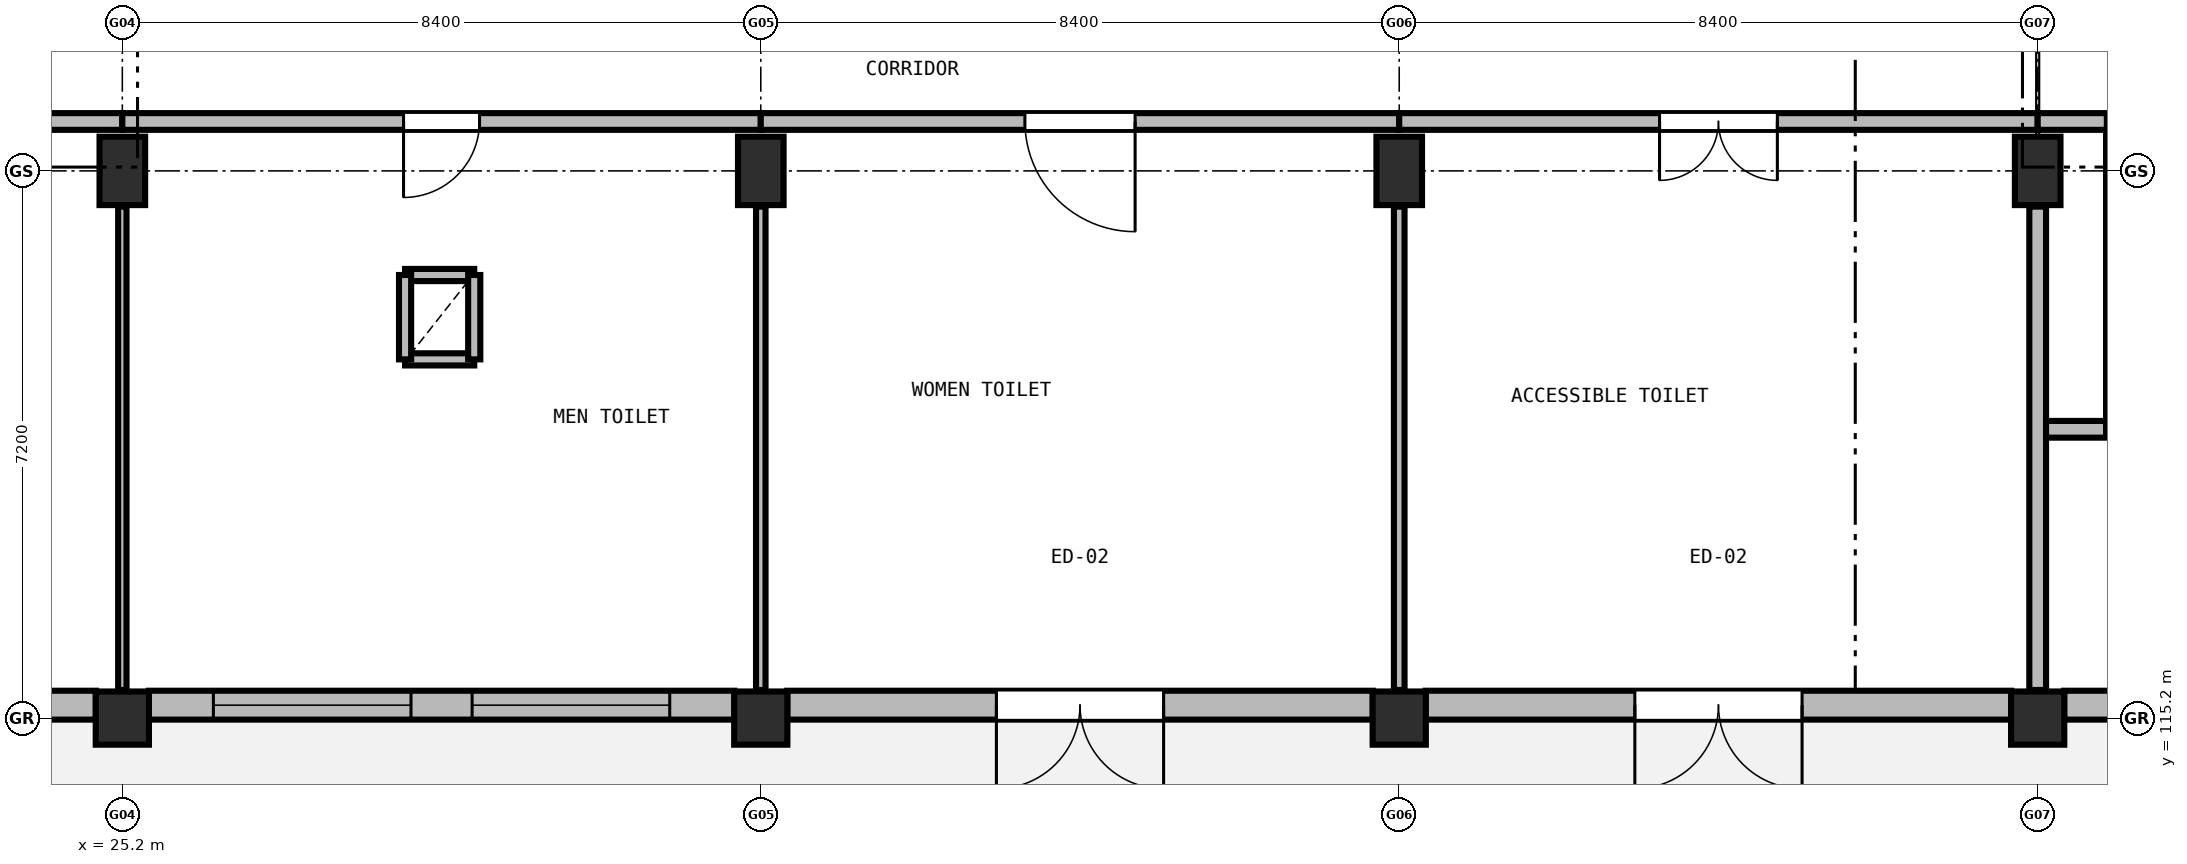
"""IFC4 building model, lengths in metres.
Left out: names, types, materials, properties, quantities, classifications, styles, units other than length and angle.
Written with IfcOpenShell. Run it as: python <this file> out.ifc"""

import sys

from ifc_helpers import new_model, si_unit, direction, frame, frame_2d, origin, origin_2d, place, context, subcontext, project, spatial, rectangle, extrude, element, fill, save


model = new_model("IFC4")
c1 = context("Model", 3, precision=1e-05, world=origin(), true_north=direction((0.0, 1.0)))
c2 = subcontext(c1, "Body", "Model", "MODEL_VIEW")
j1 = project(units=[si_unit("LENGTHUNIT", "METRE"), si_unit("PLANEANGLEUNIT", "RADIAN")], contexts=[c1])
p1 = place(None, origin())
s1 = spatial("IfcSite", under=j1, at=p1, CompositionType="ELEMENT")
p2 = place(p1, origin())
s2 = spatial("IfcBuilding", under=s1, at=p2, CompositionType="ELEMENT")
p3 = place(p2, origin())
s3 = spatial("IfcBuildingStorey", under=s2, at=p3, CompositionType="ELEMENT", Elevation=0.0)
p4 = place(p3, frame((25.2, 115.2, 0.0), z_axis=(0.0, 0.0, 1.0), x_axis=(1.0, 0.0, 0.0)))
e1 = element("IfcColumn", 1, at=p4, inside=s3, PredefinedType="COLUMN", context=c2, shape_type="SweptSolid", body=[
    extrude(rectangle(XDim=0.7, YDim=0.7, at=origin_2d()), origin(), (0.0, 0.0, 1.0), 5.1),
])
p5 = place(p3, frame((25.2, 122.4, 0.0), z_axis=(0.0, 0.0, 1.0), x_axis=(1.0, 0.0, 0.0)))
e2 = element("IfcColumn", 2, at=p5, inside=s3, PredefinedType="COLUMN", context=c2, shape_type="SweptSolid", body=[
    extrude(rectangle(XDim=0.6, YDim=0.9, at=origin_2d()), origin(), (0.0, 0.0, 1.0), 5.1),
])
p6 = place(p3, frame((33.6, 115.2, 0.0), z_axis=(0.0, 0.0, 1.0), x_axis=(1.0, 0.0, 0.0)))
e3 = element("IfcColumn", 3, at=p6, inside=s3, PredefinedType="COLUMN", context=c2, shape_type="SweptSolid", body=[
    extrude(rectangle(XDim=0.7, YDim=0.7, at=origin_2d()), origin(), (0.0, 0.0, 1.0), 5.1),
])
p7 = place(p3, frame((33.6, 122.4, 0.0), z_axis=(0.0, 0.0, 1.0), x_axis=(1.0, 0.0, 0.0)))
e4 = element("IfcColumn", 4, at=p7, inside=s3, PredefinedType="COLUMN", context=c2, shape_type="SweptSolid", body=[
    extrude(rectangle(XDim=0.6, YDim=0.9, at=origin_2d()), origin(), (0.0, 0.0, 1.0), 5.1),
])
p8 = place(p3, frame((42.0, 115.2, 0.0), z_axis=(0.0, 0.0, 1.0), x_axis=(1.0, 0.0, 0.0)))
e5 = element("IfcColumn", 5, at=p8, inside=s3, PredefinedType="COLUMN", context=c2, shape_type="SweptSolid", body=[
    extrude(rectangle(XDim=0.7, YDim=0.7, at=origin_2d()), origin(), (0.0, 0.0, 1.0), 5.1),
])
p9 = place(p3, frame((42.0, 122.4, 0.0), z_axis=(0.0, 0.0, 1.0), x_axis=(1.0, 0.0, 0.0)))
e6 = element("IfcColumn", 6, at=p9, inside=s3, PredefinedType="COLUMN", context=c2, shape_type="SweptSolid", body=[
    extrude(rectangle(XDim=0.6, YDim=0.9, at=origin_2d()), origin(), (0.0, 0.0, 1.0), 5.1),
])
p10 = place(p3, frame((50.4, 115.2, 0.0), z_axis=(0.0, 0.0, 1.0), x_axis=(1.0, 0.0, 0.0)))
e7 = element("IfcColumn", 7, at=p10, inside=s3, PredefinedType="COLUMN", context=c2, shape_type="SweptSolid", body=[
    extrude(rectangle(XDim=0.7, YDim=0.7, at=origin_2d()), origin(), (0.0, 0.0, 1.0), 5.1),
])
p11 = place(p3, frame((50.4, 122.4, 0.0), z_axis=(0.0, 0.0, 1.0), x_axis=(1.0, 0.0, 0.0)))
e8 = element("IfcColumn", 8, at=p11, inside=s3, PredefinedType="COLUMN", context=c2, shape_type="SweptSolid", body=[
    extrude(rectangle(XDim=0.6, YDim=0.9, at=origin_2d()), origin(), (0.0, 0.0, 1.0), 5.1),
])
p12 = place(p3, frame((58.452, 115.37, 0.0), z_axis=(0.0, 0.0, 1.0), x_axis=(-1.0, 0.0, 0.0)))
e9 = element("IfcWall", 9, at=p12, inside=s3, PredefinedType="SOLIDWALL", context=c2, shape_type="SweptSolid", body=[
    extrude(rectangle(XDim=7.704, YDim=0.38, at=frame_2d((3.852, 0.0))), origin(), (0.0, 0.0, 1.0), 4.01),
])
p13 = place(p12, frame((5.227, 0.0, 0.0)))
e10 = element("IfcOpeningElement", 10, at=p13, cuts=e9, PredefinedType="OPENING", context=c2, shape_type="SweptSolid", body=[
    extrude(rectangle(XDim=1.85, YDim=2.3, at=frame_2d((0.925, 1.15))), frame((0.0, 0.2, 0.0), z_axis=(0.0, -1.0, 0.0), x_axis=(1.0, 0.0, 0.0)), (0.0, 0.0, 1.0), 0.4),
])
p14 = place(p3, frame((50.052, 115.37, 0.0), z_axis=(0.0, 0.0, 1.0), x_axis=(-1.0, 0.0, 0.0)))
e11 = element("IfcWall", 11, at=p14, inside=s3, PredefinedType="SOLIDWALL", context=c2, shape_type="SweptSolid", body=[
    extrude(rectangle(XDim=7.704, YDim=0.38, at=frame_2d((3.852, 0.0))), origin(), (0.0, 0.0, 1.0), 4.01),
])
p15 = place(p14, frame((2.752, 0.0, 0.0)))
e12 = element("IfcOpeningElement", 12, at=p15, cuts=e11, PredefinedType="OPENING", context=c2, shape_type="SweptSolid", body=[
    extrude(rectangle(XDim=2.2, YDim=2.4, at=frame_2d((1.1, 1.2))), frame((0.0, 0.2, 0.0), z_axis=(0.0, -1.0, 0.0), x_axis=(1.0, 0.0, 0.0)), (0.0, 0.0, 1.0), 0.4),
])
p16 = place(p3, frame((41.652, 115.37, 0.0), z_axis=(0.0, 0.0, 1.0), x_axis=(-1.0, 0.0, 0.0)))
e13 = element("IfcWall", 13, at=p16, inside=s3, PredefinedType="SOLIDWALL", context=c2, shape_type="SweptSolid", body=[
    extrude(rectangle(XDim=7.704, YDim=0.38, at=frame_2d((3.852, 0.0))), origin(), (0.0, 0.0, 1.0), 4.01),
])
p17 = place(p16, frame((2.752, 0.0, 0.0)))
e14 = element("IfcOpeningElement", 14, at=p17, cuts=e13, PredefinedType="OPENING", context=c2, shape_type="SweptSolid", body=[
    extrude(rectangle(XDim=2.2, YDim=2.4, at=frame_2d((1.1, 1.2))), frame((0.0, 0.2, 0.0), z_axis=(0.0, -1.0, 0.0), x_axis=(1.0, 0.0, 0.0)), (0.0, 0.0, 1.0), 0.4),
])
p18 = place(p3, frame((33.252, 115.37, 0.0), z_axis=(0.0, 0.0, 1.0), x_axis=(-1.0, 0.0, 0.0)))
e15 = element("IfcWall", 15, at=p18, inside=s3, PredefinedType="SOLIDWALL", context=c2, shape_type="SweptSolid", body=[
    extrude(rectangle(XDim=7.704, YDim=0.38, at=frame_2d((3.852, 0.0))), origin(), (0.0, 0.0, 1.0), 4.01),
])
p19 = place(p18, frame((0.85, 0.0, 0.95)))
e16 = element("IfcOpeningElement", 16, at=p19, cuts=e15, PredefinedType="OPENING", context=c2, shape_type="SweptSolid", body=[
    extrude(rectangle(XDim=2.6, YDim=1.8, at=frame_2d((1.3, 0.9))), frame((0.0, 0.2, 0.0), z_axis=(0.0, -1.0, 0.0), x_axis=(1.0, 0.0, 0.0)), (0.0, 0.0, 1.0), 0.4),
])
p20 = place(p18, frame((4.254, 0.0, 0.95)))
e17 = element("IfcOpeningElement", 17, at=p20, cuts=e15, PredefinedType="OPENING", context=c2, shape_type="SweptSolid", body=[
    extrude(rectangle(XDim=2.6, YDim=1.8, at=frame_2d((1.3, 0.9))), frame((0.0, 0.2, 0.0), z_axis=(0.0, -1.0, 0.0), x_axis=(1.0, 0.0, 0.0)), (0.0, 0.0, 1.0), 0.4),
])
p21 = place(p3, frame((24.852, 115.37, 0.0), z_axis=(0.0, 0.0, 1.0), x_axis=(-1.0, 0.0, 0.0)))
e18 = element("IfcWall", 18, at=p21, inside=s3, PredefinedType="SOLIDWALL", context=c2, shape_type="SweptSolid", body=[
    extrude(rectangle(XDim=7.704, YDim=0.38, at=frame_2d((3.852, 0.0))), origin(), (0.0, 0.0, 1.0), 4.01),
])
p22 = place(p21, frame((2.852, 0.0, 0.0)))
e19 = element("IfcOpeningElement", 19, at=p22, cuts=e18, PredefinedType="OPENING", context=c2, shape_type="SweptSolid", body=[
    extrude(rectangle(XDim=2.0, YDim=2.4, at=frame_2d((1.0, 1.2))), frame((0.0, 0.2, 0.0), z_axis=(0.0, -1.0, 0.0), x_axis=(1.0, 0.0, 0.0)), (0.0, 0.0, 1.0), 0.4),
])
p23 = place(p3, frame((51.45, 119.0, 0.0), z_axis=(0.0, 0.0, 1.0), x_axis=(0.0, 1.0, 0.0)))
e20 = element("IfcWall", 20, at=p23, inside=s3, PredefinedType="SHEAR", context=c2, shape_type="SweptSolid", body=[
    extrude(rectangle(XDim=4.1, YDim=0.3, at=frame_2d((2.05, 0.0))), origin(), (0.0, 0.0, 1.0), 4.82),
])
for number, where, z_axis, x_axis in (
    (21, (28.92, 119.92, 0.0), (0.0, 0.0, 1.0), (1.0, 0.0, 0.0)),
    (22, (29.83, 121.03, 0.0), (0.0, 0.0, 1.0), (-1.0, 0.0, 0.0)),
):
    element("IfcWall", number, at=place(p3, frame(where, z_axis=z_axis, x_axis=x_axis)), inside=s3, PredefinedType="PARTITIONING", context=c2, shape_type="SweptSolid", body=[
        extrude(rectangle(XDim=0.91, YDim=0.16, at=frame_2d((0.455, 0.0))), origin(), (0.0, 0.0, 1.0), 4.55),
    ])
for number, where, z_axis, x_axis in (
    (23, (28.92, 121.03, 0.0), (0.0, 0.0, 1.0), (0.0, -1.0, 0.0)),
    (24, (29.83, 119.92, 0.0), (0.0, 0.0, 1.0), (0.0, 1.0, 0.0)),
):
    element("IfcWall", number, at=place(p3, frame(where, z_axis=z_axis, x_axis=x_axis)), inside=s3, PredefinedType="PARTITIONING", context=c2, shape_type="SweptSolid", body=[
        extrude(rectangle(XDim=1.11, YDim=0.16, at=frame_2d((0.555, 0.0))), origin(), (0.0, 0.0, 1.0), 4.55),
    ])
p24 = place(p3, frame((25.2, 123.05, 0.0), z_axis=(0.0, 0.0, 1.0), x_axis=(-1.0, 0.0, 0.0)))
e25 = element("IfcWall", 25, at=p24, inside=s3, PredefinedType="SOLIDWALL", context=c2, shape_type="SweptSolid", body=[
    extrude(rectangle(XDim=6.11, YDim=0.22, at=frame_2d((3.055, 0.0))), origin(), (0.0, 0.0, 1.0), 4.105),
])
p25 = place(p3, frame((25.2, 115.57, 0.0), z_axis=(0.0, 0.0, 1.0), x_axis=(0.0, 1.0, 0.0)))
e26 = element("IfcWall", 26, at=p25, inside=s3, PredefinedType="PARTITIONING", context=c2, shape_type="SweptSolid", body=[
    extrude(rectangle(XDim=6.36, YDim=0.11, at=frame_2d((3.18, 0.0))), origin(), (0.0, 0.0, 1.0), 4.005),
])
p26 = place(p3, frame((33.6, 123.05, 0.0), z_axis=(0.0, 0.0, 1.0), x_axis=(-1.0, 0.0, 0.0)))
e27 = element("IfcWall", 27, at=p26, inside=s3, PredefinedType="SOLIDWALL", context=c2, shape_type="SweptSolid", body=[
    extrude(rectangle(XDim=8.4, YDim=0.22, at=frame_2d((4.2, 0.0))), origin(), (0.0, 0.0, 1.0), 4.105),
])
p27 = place(p26, frame((3.7, 0.0, 0.0)))
e28 = element("IfcOpeningElement", 28, at=p27, cuts=e27, PredefinedType="OPENING", context=c2, shape_type="SweptSolid", body=[
    extrude(rectangle(XDim=1.0, YDim=2.1, at=frame_2d((0.5, 1.05))), frame((0.0, 0.12, 0.0), z_axis=(0.0, -1.0, 0.0), x_axis=(1.0, 0.0, 0.0)), (0.0, 0.0, 1.0), 0.24),
])
p28 = place(p3, frame((33.6, 115.57, 0.0), z_axis=(0.0, 0.0, 1.0), x_axis=(0.0, 1.0, 0.0)))
e29 = element("IfcWall", 29, at=p28, inside=s3, PredefinedType="PARTITIONING", context=c2, shape_type="SweptSolid", body=[
    extrude(rectangle(XDim=6.36, YDim=0.125, at=frame_2d((3.18, 0.0))), origin(), (0.0, 0.0, 1.0), 4.005),
])
p29 = place(p3, frame((42.0, 123.05, 0.0), z_axis=(0.0, 0.0, 1.0), x_axis=(-1.0, 0.0, 0.0)))
e30 = element("IfcWall", 30, at=p29, inside=s3, PredefinedType="SOLIDWALL", context=c2, shape_type="SweptSolid", body=[
    extrude(rectangle(XDim=8.4, YDim=0.22, at=frame_2d((4.2, 0.0))), origin(), (0.0, 0.0, 1.0), 4.105),
])
p30 = place(p29, frame((3.475, 0.0, 0.0)))
e31 = element("IfcOpeningElement", 31, at=p30, cuts=e30, PredefinedType="OPENING", context=c2, shape_type="SweptSolid", body=[
    extrude(rectangle(XDim=1.45, YDim=2.2, at=frame_2d((0.725, 1.1))), frame((0.0, 0.12, 0.0), z_axis=(0.0, -1.0, 0.0), x_axis=(1.0, 0.0, 0.0)), (0.0, 0.0, 1.0), 0.24),
])
p31 = place(p3, frame((42.0, 115.57, 0.0), z_axis=(0.0, 0.0, 1.0), x_axis=(0.0, 1.0, 0.0)))
e32 = element("IfcWall", 32, at=p31, inside=s3, PredefinedType="PARTITIONING", context=c2, shape_type="SweptSolid", body=[
    extrude(rectangle(XDim=6.36, YDim=0.14, at=frame_2d((3.18, 0.0))), origin(), (0.0, 0.0, 1.0), 4.005),
])
p32 = place(p3, frame((50.4, 123.05, 0.0), z_axis=(0.0, 0.0, 1.0), x_axis=(-1.0, 0.0, 0.0)))
e33 = element("IfcWall", 33, at=p32, inside=s3, PredefinedType="SOLIDWALL", context=c2, shape_type="SweptSolid", body=[
    extrude(rectangle(XDim=8.4, YDim=0.22, at=frame_2d((4.2, 0.0))), origin(), (0.0, 0.0, 1.0), 4.105),
])
p33 = place(p32, frame((3.425, 0.0, 0.0)))
e34 = element("IfcOpeningElement", 34, at=p33, cuts=e33, PredefinedType="OPENING", context=c2, shape_type="SweptSolid", body=[
    extrude(rectangle(XDim=1.55, YDim=2.2, at=frame_2d((0.775, 1.1))), frame((0.0, 0.12, 0.0), z_axis=(0.0, -1.0, 0.0), x_axis=(1.0, 0.0, 0.0)), (0.0, 0.0, 1.0), 0.24),
])
p34 = place(p3, frame((50.4, 115.57, 0.0), z_axis=(0.0, 0.0, 1.0), x_axis=(0.0, 1.0, 0.0)))
e35 = element("IfcWall", 35, at=p34, inside=s3, PredefinedType="SOLIDWALL", context=c2, shape_type="SweptSolid", body=[
    extrude(rectangle(XDim=6.36, YDim=0.22, at=frame_2d((3.18, 0.0))), origin(), (0.0, 0.0, 1.0), 4.005),
])
p35 = place(p3, frame((51.31, 123.05, 0.0), z_axis=(0.0, 0.0, 1.0), x_axis=(-1.0, 0.0, 0.0)))
e36 = element("IfcWall", 36, at=p35, inside=s3, PredefinedType="SOLIDWALL", context=c2, shape_type="SweptSolid", body=[
    extrude(rectangle(XDim=0.91, YDim=0.22, at=frame_2d((0.455, 0.0))), origin(), (0.0, 0.0, 1.0), 4.105),
])
p36 = place(p3, frame((50.51, 119.0, 0.0), z_axis=(0.0, 0.0, 1.0), x_axis=(1.0, 0.0, 0.0)))
e37 = element("IfcWall", 37, at=p36, inside=s3, PredefinedType="SOLIDWALL", context=c2, shape_type="SweptSolid", body=[
    extrude(rectangle(XDim=0.79, YDim=0.22, at=frame_2d((0.395, 0.0))), origin(), (0.0, 0.0, 1.0), 4.105),
])
p37 = place(p15, origin())
e38 = element("IfcDoor", 38, at=p37, inside=s3, OperationType="DOUBLE_DOOR_SINGLE_SWING", PredefinedType="DOOR", context=c2, shape_type="SweptSolid", body=[
    extrude(rectangle(XDim=2.2, YDim=2.4, at=frame_2d((1.1, 1.2))), frame((0.0, 0.025, 0.0), z_axis=(0.0, -1.0, 0.0), x_axis=(1.0, 0.0, 0.0)), (0.0, 0.0, 1.0), 0.05),
])
fill(e12, e38)
p38 = place(p17, origin())
e39 = element("IfcDoor", 39, at=p38, inside=s3, OperationType="DOUBLE_DOOR_SINGLE_SWING", PredefinedType="DOOR", context=c2, shape_type="SweptSolid", body=[
    extrude(rectangle(XDim=2.2, YDim=2.4, at=frame_2d((1.1, 1.2))), frame((0.0, 0.025, 0.0), z_axis=(0.0, -1.0, 0.0), x_axis=(1.0, 0.0, 0.0)), (0.0, 0.0, 1.0), 0.05),
])
fill(e14, e39)
p39 = place(p19, origin())
e40 = element("IfcWindow", 40, at=p39, inside=s3, PartitioningType="SINGLE_PANEL", PredefinedType="WINDOW", context=c2, shape_type="SweptSolid", body=[
    extrude(rectangle(XDim=2.6, YDim=1.8, at=frame_2d((1.3, 0.9))), frame((0.0, 0.03, 0.0), z_axis=(0.0, -1.0, 0.0), x_axis=(1.0, 0.0, 0.0)), (0.0, 0.0, 1.0), 0.06),
])
fill(e16, e40)
p40 = place(p20, origin())
e41 = element("IfcWindow", 41, at=p40, inside=s3, PartitioningType="SINGLE_PANEL", PredefinedType="WINDOW", context=c2, shape_type="SweptSolid", body=[
    extrude(rectangle(XDim=2.6, YDim=1.8, at=frame_2d((1.3, 0.9))), frame((0.0, 0.03, 0.0), z_axis=(0.0, -1.0, 0.0), x_axis=(1.0, 0.0, 0.0)), (0.0, 0.0, 1.0), 0.06),
])
fill(e17, e41)
p41 = place(p27, origin())
e42 = element("IfcDoor", 42, at=p41, inside=s3, OperationType="SINGLE_SWING_RIGHT", PredefinedType="DOOR", context=c2, shape_type="SweptSolid", body=[
    extrude(rectangle(XDim=1.0, YDim=2.1, at=frame_2d((0.5, 1.05))), frame((0.0, 0.025, 0.0), z_axis=(0.0, -1.0, 0.0), x_axis=(1.0, 0.0, 0.0)), (0.0, 0.0, 1.0), 0.05),
])
fill(e28, e42)
p42 = place(p30, origin())
e43 = element("IfcDoor", 43, at=p42, inside=s3, OperationType="SINGLE_SWING_LEFT", PredefinedType="DOOR", context=c2, shape_type="SweptSolid", body=[
    extrude(rectangle(XDim=1.45, YDim=2.2, at=frame_2d((0.725, 1.1))), frame((0.0, 0.025, 0.0), z_axis=(0.0, -1.0, 0.0), x_axis=(1.0, 0.0, 0.0)), (0.0, 0.0, 1.0), 0.05),
])
fill(e31, e43)
p43 = place(p33, origin())
e44 = element("IfcDoor", 44, at=p43, inside=s3, OperationType="DOUBLE_DOOR_SINGLE_SWING", PredefinedType="DOOR", context=c2, shape_type="SweptSolid", body=[
    extrude(rectangle(XDim=1.55, YDim=2.2, at=frame_2d((0.775, 1.1))), frame((0.0, 0.025, 0.0), z_axis=(0.0, -1.0, 0.0), x_axis=(1.0, 0.0, 0.0)), (0.0, 0.0, 1.0), 0.05),
])
fill(e34, e44)
save(model, sys.argv[1])
